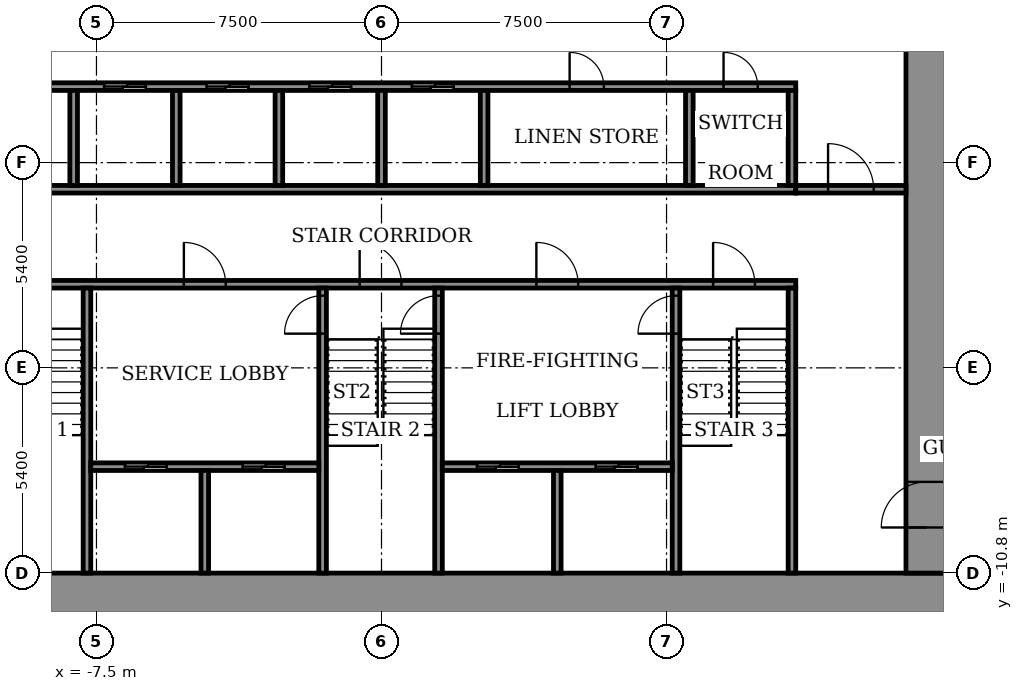
"""IFC4 building model, lengths in metres.
Left out: names, types, materials, properties, quantities, classifications, styles, units other than length and angle.
Written with IfcOpenShell. Run it as: python <this file> out.ifc"""

import sys

from ifc_helpers import new_model, si_unit, direction, frame, frame_2d, origin, place, context, subcontext, project, spatial, rectangle, extrude, element, fill, save


model = new_model("IFC4")
c1 = context("Model", 3, precision=1e-05, world=origin(), true_north=direction((0.0, 1.0)))
c2 = subcontext(c1, "Body", "Model", "MODEL_VIEW")
j1 = project(units=[si_unit("LENGTHUNIT", "METRE"), si_unit("PLANEANGLEUNIT", "RADIAN")], contexts=[c1])
p1 = place(None, origin())
s1 = spatial("IfcSite", under=j1, at=p1, CompositionType="ELEMENT")
p2 = place(p1, origin())
s2 = spatial("IfcBuilding", under=s1, at=p2, CompositionType="ELEMENT")
p3 = place(p2, frame((0.0, 0.0, 71.1)))
s3 = spatial("IfcBuildingStorey", under=s2, at=p3, CompositionType="ELEMENT", Elevation=71.1)
p4 = place(p3, frame((-14.9, -11.35, 0.0), z_axis=(0.0, 0.0, 1.0), x_axis=(1.0, 0.0, 0.0)))
e1 = element("IfcWall", 1, at=p4, inside=s3, PredefinedType="SHEAR", context=c2, shape_type="SweptSolid", body=[
    extrude(rectangle(XDim=29.8, YDim=1.1, at=frame_2d((14.9, 0.0))), origin(), (0.0, 0.0, 1.0), 3.6),
])
p5 = place(p3, frame((14.35, -10.8, 0.0), z_axis=(0.0, 0.0, 1.0), x_axis=(0.0, 1.0, 0.0)))
e2 = element("IfcWall", 2, at=p5, inside=s3, PredefinedType="SHEAR", context=c2, shape_type="SweptSolid", body=[
    extrude(rectangle(XDim=21.6, YDim=1.1, at=frame_2d((10.8, 0.0))), origin(), (0.0, 0.0, 1.0), 3.6),
])
p6 = place(p5, frame((1.2, 0.0, 0.0)))
e3 = element("IfcOpeningElement", 3, at=p6, cuts=e2, PredefinedType="OPENING", context=c2, shape_type="SweptSolid", body=[
    extrude(rectangle(XDim=1.2, YDim=2.1, at=frame_2d((0.6, 1.05))), frame((0.0, 0.56, 0.0), z_axis=(0.0, -1.0, 0.0), x_axis=(1.0, 0.0, 0.0)), (0.0, 0.0, 1.0), 1.12),
])
p7 = place(p3, frame((-10.9, -3.2, 0.0), z_axis=(0.0, 0.0, 1.0), x_axis=(1.0, 0.0, 0.0)))
e4 = element("IfcWall", 4, at=p7, inside=s3, PredefinedType="SHEAR", context=c2, shape_type="SweptSolid", body=[
    extrude(rectangle(XDim=21.8, YDim=0.2, at=frame_2d((10.9, 0.0))), origin(), (0.0, 0.0, 1.0), 3.05),
])
p8 = place(p7, frame((1.075, 0.0, 0.0)))
e5 = element("IfcOpeningElement", 5, at=p8, cuts=e4, PredefinedType="OPENING", context=c2, shape_type="SweptSolid", body=[
    extrude(rectangle(XDim=1.1, YDim=2.1, at=frame_2d((0.55, 1.05))), frame((0.0, 0.11, 0.0), z_axis=(0.0, -1.0, 0.0), x_axis=(1.0, 0.0, 0.0)), (0.0, 0.0, 1.0), 0.22),
])
p9 = place(p7, frame((10.325, 0.0, 0.0)))
e6 = element("IfcOpeningElement", 6, at=p9, cuts=e4, PredefinedType="OPENING", context=c2, shape_type="SweptSolid", body=[
    extrude(rectangle(XDim=1.1, YDim=2.1, at=frame_2d((0.55, 1.05))), frame((0.0, 0.11, 0.0), z_axis=(0.0, -1.0, 0.0), x_axis=(1.0, 0.0, 0.0)), (0.0, 0.0, 1.0), 0.22),
])
p10 = place(p7, frame((19.625, 0.0, 0.0)))
e7 = element("IfcOpeningElement", 7, at=p10, cuts=e4, PredefinedType="OPENING", context=c2, shape_type="SweptSolid", body=[
    extrude(rectangle(XDim=1.1, YDim=2.1, at=frame_2d((0.55, 1.05))), frame((0.0, 0.11, 0.0), z_axis=(0.0, -1.0, 0.0), x_axis=(1.0, 0.0, 0.0)), (0.0, 0.0, 1.0), 0.22),
])
p11 = place(p7, frame((5.7, 0.0, 0.0)))
e8 = element("IfcOpeningElement", 8, at=p11, cuts=e4, PredefinedType="OPENING", context=c2, shape_type="SweptSolid", body=[
    extrude(rectangle(XDim=1.1, YDim=2.1, at=frame_2d((0.55, 1.05))), frame((0.0, 0.11, 0.0), z_axis=(0.0, -1.0, 0.0), x_axis=(1.0, 0.0, 0.0)), (0.0, 0.0, 1.0), 0.22),
])
p12 = place(p7, frame((14.975, 0.0, 0.0)))
e9 = element("IfcOpeningElement", 9, at=p12, cuts=e4, PredefinedType="OPENING", context=c2, shape_type="SweptSolid", body=[
    extrude(rectangle(XDim=1.1, YDim=2.1, at=frame_2d((0.55, 1.05))), frame((0.0, 0.11, 0.0), z_axis=(0.0, -1.0, 0.0), x_axis=(1.0, 0.0, 0.0)), (0.0, 0.0, 1.0), 0.22),
])
p13 = place(p3, frame((-10.9, -0.7, 0.0), z_axis=(0.0, 0.0, 1.0), x_axis=(1.0, 0.0, 0.0)))
e10 = element("IfcWall", 10, at=p13, inside=s3, PredefinedType="SHEAR", context=c2, shape_type="SweptSolid", body=[
    extrude(rectangle(XDim=21.8, YDim=0.2, at=frame_2d((10.9, 0.0))), origin(), (0.0, 0.0, 1.0), 3.05),
])
p14 = place(p3, frame((-10.9, 2.0, 0.0), z_axis=(0.0, 0.0, 1.0), x_axis=(1.0, 0.0, 0.0)))
e11 = element("IfcWall", 11, at=p14, inside=s3, PredefinedType="SHEAR", context=c2, shape_type="SweptSolid", body=[
    extrude(rectangle(XDim=21.8, YDim=0.2, at=frame_2d((10.9, 0.0))), origin(), (0.0, 0.0, 1.0), 3.05),
])
p15 = place(p14, frame((0.9, 0.0, 0.0)))
e12 = element("IfcOpeningElement", 12, at=p15, cuts=e11, PredefinedType="OPENING", context=c2, shape_type="SweptSolid", body=[
    extrude(rectangle(XDim=1.1, YDim=2.1, at=frame_2d((0.55, 1.05))), frame((0.0, 0.11, 0.0), z_axis=(0.0, -1.0, 0.0), x_axis=(1.0, 0.0, 0.0)), (0.0, 0.0, 1.0), 0.22),
])
p16 = place(p14, frame((3.6, 0.0, 0.0)))
e13 = element("IfcOpeningElement", 13, at=p16, cuts=e11, PredefinedType="OPENING", context=c2, shape_type="SweptSolid", body=[
    extrude(rectangle(XDim=1.1, YDim=2.1, at=frame_2d((0.55, 1.05))), frame((0.0, 0.11, 0.0), z_axis=(0.0, -1.0, 0.0), x_axis=(1.0, 0.0, 0.0)), (0.0, 0.0, 1.0), 0.22),
])
p17 = place(p14, frame((6.3, 0.0, 0.0)))
e14 = element("IfcOpeningElement", 14, at=p17, cuts=e11, PredefinedType="OPENING", context=c2, shape_type="SweptSolid", body=[
    extrude(rectangle(XDim=1.1, YDim=2.1, at=frame_2d((0.55, 1.05))), frame((0.0, 0.11, 0.0), z_axis=(0.0, -1.0, 0.0), x_axis=(1.0, 0.0, 0.0)), (0.0, 0.0, 1.0), 0.22),
])
p18 = place(p14, frame((9.0, 0.0, 0.0)))
e15 = element("IfcOpeningElement", 15, at=p18, cuts=e11, PredefinedType="OPENING", context=c2, shape_type="SweptSolid", body=[
    extrude(rectangle(XDim=1.1, YDim=2.1, at=frame_2d((0.55, 1.05))), frame((0.0, 0.11, 0.0), z_axis=(0.0, -1.0, 0.0), x_axis=(1.0, 0.0, 0.0)), (0.0, 0.0, 1.0), 0.22),
])
p19 = place(p14, frame((11.7, 0.0, 0.0)))
e16 = element("IfcOpeningElement", 16, at=p19, cuts=e11, PredefinedType="OPENING", context=c2, shape_type="SweptSolid", body=[
    extrude(rectangle(XDim=1.1, YDim=2.1, at=frame_2d((0.55, 1.05))), frame((0.0, 0.11, 0.0), z_axis=(0.0, -1.0, 0.0), x_axis=(1.0, 0.0, 0.0)), (0.0, 0.0, 1.0), 0.22),
])
p20 = place(p14, frame((15.85, 0.0, 0.0)))
e17 = element("IfcOpeningElement", 17, at=p20, cuts=e11, PredefinedType="OPENING", context=c2, shape_type="SweptSolid", body=[
    extrude(rectangle(XDim=0.9, YDim=2.1, at=frame_2d((0.45, 1.05))), frame((0.0, 0.11, 0.0), z_axis=(0.0, -1.0, 0.0), x_axis=(1.0, 0.0, 0.0)), (0.0, 0.0, 1.0), 0.22),
])
p21 = place(p14, frame((19.9, 0.0, 0.0)))
e18 = element("IfcOpeningElement", 18, at=p21, cuts=e11, PredefinedType="OPENING", context=c2, shape_type="SweptSolid", body=[
    extrude(rectangle(XDim=0.9, YDim=2.1, at=frame_2d((0.45, 1.05))), frame((0.0, 0.11, 0.0), z_axis=(0.0, -1.0, 0.0), x_axis=(1.0, 0.0, 0.0)), (0.0, 0.0, 1.0), 0.22),
])
p22 = place(p3, frame((-7.75, -10.8, 0.0), z_axis=(0.0, 0.0, 1.0), x_axis=(0.0, 1.0, 0.0)))
e19 = element("IfcWall", 19, at=p22, inside=s3, PredefinedType="SHEAR", context=c2, shape_type="SweptSolid", body=[
    extrude(rectangle(XDim=7.5, YDim=0.2, at=frame_2d((3.75, 0.0))), origin(), (0.0, 0.0, 1.0), 3.05),
])
p23 = place(p3, frame((-1.55, -10.8, 0.0), z_axis=(0.0, 0.0, 1.0), x_axis=(0.0, 1.0, 0.0)))
e20 = element("IfcWall", 20, at=p23, inside=s3, PredefinedType="SHEAR", context=c2, shape_type="SweptSolid", body=[
    extrude(rectangle(XDim=7.5, YDim=0.2, at=frame_2d((3.75, 0.0))), origin(), (0.0, 0.0, 1.0), 3.05),
])
p24 = place(p23, frame((6.3, 0.0, 0.0)))
e21 = element("IfcOpeningElement", 21, at=p24, cuts=e20, PredefinedType="OPENING", context=c2, shape_type="SweptSolid", body=[
    extrude(rectangle(XDim=1.0, YDim=2.1, at=frame_2d((0.5, 1.05))), frame((0.0, 0.11, 0.0), z_axis=(0.0, -1.0, 0.0), x_axis=(1.0, 0.0, 0.0)), (0.0, 0.0, 1.0), 0.22),
])
p25 = place(p3, frame((1.5, -10.8, 0.0), z_axis=(0.0, 0.0, 1.0), x_axis=(0.0, 1.0, 0.0)))
e22 = element("IfcWall", 22, at=p25, inside=s3, PredefinedType="SHEAR", context=c2, shape_type="SweptSolid", body=[
    extrude(rectangle(XDim=7.5, YDim=0.2, at=frame_2d((3.75, 0.0))), origin(), (0.0, 0.0, 1.0), 3.05),
])
p26 = place(p25, frame((6.3, 0.0, 0.0)))
e23 = element("IfcOpeningElement", 23, at=p26, cuts=e22, PredefinedType="OPENING", context=c2, shape_type="SweptSolid", body=[
    extrude(rectangle(XDim=1.0, YDim=2.1, at=frame_2d((0.5, 1.05))), frame((0.0, 0.11, 0.0), z_axis=(0.0, -1.0, 0.0), x_axis=(1.0, 0.0, 0.0)), (0.0, 0.0, 1.0), 0.22),
])
p27 = place(p3, frame((7.75, -10.8, 0.0), z_axis=(0.0, 0.0, 1.0), x_axis=(0.0, 1.0, 0.0)))
e24 = element("IfcWall", 24, at=p27, inside=s3, PredefinedType="SHEAR", context=c2, shape_type="SweptSolid", body=[
    extrude(rectangle(XDim=7.5, YDim=0.2, at=frame_2d((3.75, 0.0))), origin(), (0.0, 0.0, 1.0), 3.05),
])
p28 = place(p27, frame((6.3, 0.0, 0.0)))
e25 = element("IfcOpeningElement", 25, at=p28, cuts=e24, PredefinedType="OPENING", context=c2, shape_type="SweptSolid", body=[
    extrude(rectangle(XDim=1.0, YDim=2.1, at=frame_2d((0.5, 1.05))), frame((0.0, 0.11, 0.0), z_axis=(0.0, -1.0, 0.0), x_axis=(1.0, 0.0, 0.0)), (0.0, 0.0, 1.0), 0.22),
])
p29 = place(p3, frame((10.8, -10.8, 0.0), z_axis=(0.0, 0.0, 1.0), x_axis=(0.0, 1.0, 0.0)))
e26 = element("IfcWall", 26, at=p29, inside=s3, PredefinedType="SHEAR", context=c2, shape_type="SweptSolid", body=[
    extrude(rectangle(XDim=7.5, YDim=0.2, at=frame_2d((3.75, 0.0))), origin(), (0.0, 0.0, 1.0), 3.05),
])
p30 = place(p3, frame((-7.65, -8.0, 0.0), z_axis=(0.0, 0.0, 1.0), x_axis=(1.0, 0.0, 0.0)))
e27 = element("IfcWall", 27, at=p30, inside=s3, PredefinedType="SHEAR", context=c2, shape_type="SweptSolid", body=[
    extrude(rectangle(XDim=6.0, YDim=0.2, at=frame_2d((3.0, 0.0))), origin(), (0.0, 0.0, 1.0), 3.05),
])
p31 = place(p30, frame((0.9, 0.0, 0.0)))
e28 = element("IfcOpeningElement", 28, at=p31, cuts=e27, PredefinedType="OPENING", context=c2, shape_type="SweptSolid", body=[
    extrude(rectangle(XDim=1.1, YDim=2.1, at=frame_2d((0.55, 1.05))), frame((0.0, 0.11, 0.0), z_axis=(0.0, -1.0, 0.0), x_axis=(1.0, 0.0, 0.0)), (0.0, 0.0, 1.0), 0.22),
])
p32 = place(p30, frame((4.0, 0.0, 0.0)))
e29 = element("IfcOpeningElement", 29, at=p32, cuts=e27, PredefinedType="OPENING", context=c2, shape_type="SweptSolid", body=[
    extrude(rectangle(XDim=1.1, YDim=2.1, at=frame_2d((0.55, 1.05))), frame((0.0, 0.11, 0.0), z_axis=(0.0, -1.0, 0.0), x_axis=(1.0, 0.0, 0.0)), (0.0, 0.0, 1.0), 0.22),
])
p33 = place(p3, frame((-4.65, -10.8, 0.0), z_axis=(0.0, 0.0, 1.0), x_axis=(0.0, 1.0, 0.0)))
e30 = element("IfcWall", 30, at=p33, inside=s3, PredefinedType="SHEAR", context=c2, shape_type="SweptSolid", body=[
    extrude(rectangle(XDim=2.7, YDim=0.2, at=frame_2d((1.35, 0.0))), origin(), (0.0, 0.0, 1.0), 3.05),
])
p34 = place(p3, frame((1.6, -8.0, 0.0), z_axis=(0.0, 0.0, 1.0), x_axis=(1.0, 0.0, 0.0)))
e31 = element("IfcWall", 31, at=p34, inside=s3, PredefinedType="SHEAR", context=c2, shape_type="SweptSolid", body=[
    extrude(rectangle(XDim=6.05, YDim=0.2, at=frame_2d((3.025, 0.0))), origin(), (0.0, 0.0, 1.0), 3.05),
])
p35 = place(p34, frame((0.913, 0.0, 0.0)))
e32 = element("IfcOpeningElement", 32, at=p35, cuts=e31, PredefinedType="OPENING", context=c2, shape_type="SweptSolid", body=[
    extrude(rectangle(XDim=1.1, YDim=2.1, at=frame_2d((0.55, 1.05))), frame((0.0, 0.11, 0.0), z_axis=(0.0, -1.0, 0.0), x_axis=(1.0, 0.0, 0.0)), (0.0, 0.0, 1.0), 0.22),
])
p36 = place(p34, frame((4.038, 0.0, 0.0)))
e33 = element("IfcOpeningElement", 33, at=p36, cuts=e31, PredefinedType="OPENING", context=c2, shape_type="SweptSolid", body=[
    extrude(rectangle(XDim=1.1, YDim=2.1, at=frame_2d((0.55, 1.05))), frame((0.0, 0.11, 0.0), z_axis=(0.0, -1.0, 0.0), x_axis=(1.0, 0.0, 0.0)), (0.0, 0.0, 1.0), 0.22),
])
p37 = place(p3, frame((4.625, -10.8, 0.0), z_axis=(0.0, 0.0, 1.0), x_axis=(0.0, 1.0, 0.0)))
e34 = element("IfcWall", 34, at=p37, inside=s3, PredefinedType="SHEAR", context=c2, shape_type="SweptSolid", body=[
    extrude(rectangle(XDim=2.7, YDim=0.2, at=frame_2d((1.35, 0.0))), origin(), (0.0, 0.0, 1.0), 3.05),
])
for number, where, z_axis, x_axis in (
    (35, (-8.1, -0.6, 0.0), (0.0, 0.0, 1.0), (0.0, 1.0, 0.0)),
    (36, (-5.4, -0.6, 0.0), (0.0, 0.0, 1.0), (0.0, 1.0, 0.0)),
    (37, (-2.7, -0.6, 0.0), (0.0, 0.0, 1.0), (0.0, 1.0, 0.0)),
    (38, (0.0, -0.6, 0.0), (0.0, 0.0, 1.0), (0.0, 1.0, 0.0)),
    (39, (2.7, -0.6, 0.0), (0.0, 0.0, 1.0), (0.0, 1.0, 0.0)),
):
    element("IfcWall", number, at=place(p3, frame(where, z_axis=z_axis, x_axis=x_axis)), inside=s3, PredefinedType="SHEAR", context=c2, shape_type="SweptSolid", body=[
        extrude(rectangle(XDim=2.5, YDim=0.2, at=frame_2d((1.25, 0.0))), origin(), (0.0, 0.0, 1.0), 3.05),
    ])
for number, where, z_axis, x_axis in (
    (40, (8.1, -0.6, 0.0), (0.0, 0.0, 1.0), (0.0, 1.0, 0.0)),
    (41, (10.8, -0.6, 0.0), (0.0, 0.0, 1.0), (0.0, 1.0, 0.0)),
):
    element("IfcWall", number, at=place(p3, frame(where, z_axis=z_axis, x_axis=x_axis)), inside=s3, PredefinedType="STANDARD", context=c2, shape_type="SweptSolid", body=[
        extrude(rectangle(XDim=2.5, YDim=0.2, at=frame_2d((1.25, 0.0))), origin(), (0.0, 0.0, 1.0), 3.05),
    ])
p38 = place(p3, frame((10.9, -0.7, 0.0), z_axis=(0.0, 0.0, 1.0), x_axis=(1.0, 0.0, 0.0)))
e42 = element("IfcWall", 42, at=p38, inside=s3, PredefinedType="STANDARD", context=c2, shape_type="SweptSolid", body=[
    extrude(rectangle(XDim=2.9, YDim=0.2, at=frame_2d((1.45, 0.0))), origin(), (0.0, 0.0, 1.0), 3.05),
])
p39 = place(p38, frame((0.85, 0.0, 0.0)))
e43 = element("IfcOpeningElement", 43, at=p39, cuts=e42, PredefinedType="OPENING", context=c2, shape_type="SweptSolid", body=[
    extrude(rectangle(XDim=1.2, YDim=2.1, at=frame_2d((0.6, 1.05))), frame((0.0, 0.11, 0.0), z_axis=(0.0, -1.0, 0.0), x_axis=(1.0, 0.0, 0.0)), (0.0, 0.0, 1.0), 0.22),
])
p40 = place(p6, origin())
e44 = element("IfcDoor", 44, at=p40, inside=s3, OperationType="DOUBLE_DOOR_SINGLE_SWING", PredefinedType="DOOR", context=c2, shape_type="SweptSolid", body=[
    extrude(rectangle(XDim=1.2, YDim=2.1, at=frame_2d((0.6, 1.05))), frame((0.0, 0.025, 0.0), z_axis=(0.0, -1.0, 0.0), x_axis=(1.0, 0.0, 0.0)), (0.0, 0.0, 1.0), 0.05),
])
fill(e3, e44)
p41 = place(p16, origin())
e45 = element("IfcDoor", 45, at=p41, inside=s3, OperationType="SLIDING_TO_LEFT", PredefinedType="DOOR", context=c2, shape_type="SweptSolid", body=[
    extrude(rectangle(XDim=1.1, YDim=2.1, at=frame_2d((0.55, 1.05))), frame((0.0, 0.025, 0.0), z_axis=(0.0, -1.0, 0.0), x_axis=(1.0, 0.0, 0.0)), (0.0, 0.0, 1.0), 0.05),
])
fill(e13, e45)
p42 = place(p17, origin())
e46 = element("IfcDoor", 46, at=p42, inside=s3, OperationType="SLIDING_TO_LEFT", PredefinedType="DOOR", context=c2, shape_type="SweptSolid", body=[
    extrude(rectangle(XDim=1.1, YDim=2.1, at=frame_2d((0.55, 1.05))), frame((0.0, 0.025, 0.0), z_axis=(0.0, -1.0, 0.0), x_axis=(1.0, 0.0, 0.0)), (0.0, 0.0, 1.0), 0.05),
])
fill(e14, e46)
p43 = place(p18, origin())
e47 = element("IfcDoor", 47, at=p43, inside=s3, OperationType="SLIDING_TO_LEFT", PredefinedType="DOOR", context=c2, shape_type="SweptSolid", body=[
    extrude(rectangle(XDim=1.1, YDim=2.1, at=frame_2d((0.55, 1.05))), frame((0.0, 0.025, 0.0), z_axis=(0.0, -1.0, 0.0), x_axis=(1.0, 0.0, 0.0)), (0.0, 0.0, 1.0), 0.05),
])
fill(e15, e47)
p44 = place(p19, origin())
e48 = element("IfcDoor", 48, at=p44, inside=s3, OperationType="SLIDING_TO_LEFT", PredefinedType="DOOR", context=c2, shape_type="SweptSolid", body=[
    extrude(rectangle(XDim=1.1, YDim=2.1, at=frame_2d((0.55, 1.05))), frame((0.0, 0.025, 0.0), z_axis=(0.0, -1.0, 0.0), x_axis=(1.0, 0.0, 0.0)), (0.0, 0.0, 1.0), 0.05),
])
fill(e16, e48)
p45 = place(p20, origin())
e49 = element("IfcDoor", 49, at=p45, inside=s3, OperationType="SINGLE_SWING_RIGHT", PredefinedType="DOOR", context=c2, shape_type="SweptSolid", body=[
    extrude(rectangle(XDim=0.9, YDim=2.1, at=frame_2d((0.45, 1.05))), frame((0.0, 0.025, 0.0), z_axis=(0.0, -1.0, 0.0), x_axis=(1.0, 0.0, 0.0)), (0.0, 0.0, 1.0), 0.05),
])
fill(e17, e49)
p46 = place(p21, origin())
e50 = element("IfcDoor", 50, at=p46, inside=s3, OperationType="SINGLE_SWING_LEFT", PredefinedType="DOOR", context=c2, shape_type="SweptSolid", body=[
    extrude(rectangle(XDim=0.9, YDim=2.1, at=frame_2d((0.45, 1.05))), frame((0.0, 0.025, 0.0), z_axis=(0.0, -1.0, 0.0), x_axis=(1.0, 0.0, 0.0)), (0.0, 0.0, 1.0), 0.05),
])
fill(e18, e50)
p47 = place(p35, origin())
e51 = element("IfcDoor", 51, at=p47, inside=s3, OperationType="SLIDING_TO_LEFT", PredefinedType="DOOR", context=c2, shape_type="SweptSolid", body=[
    extrude(rectangle(XDim=1.1, YDim=2.1, at=frame_2d((0.55, 1.05))), frame((0.0, 0.025, 0.0), z_axis=(0.0, -1.0, 0.0), x_axis=(1.0, 0.0, 0.0)), (0.0, 0.0, 1.0), 0.05),
])
fill(e32, e51)
p48 = place(p31, origin())
e52 = element("IfcDoor", 52, at=p48, inside=s3, OperationType="SLIDING_TO_LEFT", PredefinedType="DOOR", context=c2, shape_type="SweptSolid", body=[
    extrude(rectangle(XDim=1.1, YDim=2.1, at=frame_2d((0.55, 1.05))), frame((0.0, 0.025, 0.0), z_axis=(0.0, -1.0, 0.0), x_axis=(1.0, 0.0, 0.0)), (0.0, 0.0, 1.0), 0.05),
])
fill(e28, e52)
p49 = place(p36, origin())
e53 = element("IfcDoor", 53, at=p49, inside=s3, OperationType="SLIDING_TO_LEFT", PredefinedType="DOOR", context=c2, shape_type="SweptSolid", body=[
    extrude(rectangle(XDim=1.1, YDim=2.1, at=frame_2d((0.55, 1.05))), frame((0.0, 0.025, 0.0), z_axis=(0.0, -1.0, 0.0), x_axis=(1.0, 0.0, 0.0)), (0.0, 0.0, 1.0), 0.05),
])
fill(e33, e53)
p50 = place(p32, origin())
e54 = element("IfcDoor", 54, at=p50, inside=s3, OperationType="SLIDING_TO_LEFT", PredefinedType="DOOR", context=c2, shape_type="SweptSolid", body=[
    extrude(rectangle(XDim=1.1, YDim=2.1, at=frame_2d((0.55, 1.05))), frame((0.0, 0.025, 0.0), z_axis=(0.0, -1.0, 0.0), x_axis=(1.0, 0.0, 0.0)), (0.0, 0.0, 1.0), 0.05),
])
fill(e29, e54)
p51 = place(p9, origin())
e55 = element("IfcDoor", 55, at=p51, inside=s3, OperationType="SINGLE_SWING_RIGHT", PredefinedType="DOOR", context=c2, shape_type="SweptSolid", body=[
    extrude(rectangle(XDim=1.1, YDim=2.1, at=frame_2d((0.55, 1.05))), frame((0.0, 0.025, 0.0), z_axis=(0.0, -1.0, 0.0), x_axis=(1.0, 0.0, 0.0)), (0.0, 0.0, 1.0), 0.05),
])
fill(e6, e55)
p52 = place(p10, origin())
e56 = element("IfcDoor", 56, at=p52, inside=s3, OperationType="SINGLE_SWING_RIGHT", PredefinedType="DOOR", context=c2, shape_type="SweptSolid", body=[
    extrude(rectangle(XDim=1.1, YDim=2.1, at=frame_2d((0.55, 1.05))), frame((0.0, 0.025, 0.0), z_axis=(0.0, -1.0, 0.0), x_axis=(1.0, 0.0, 0.0)), (0.0, 0.0, 1.0), 0.05),
])
fill(e7, e56)
p53 = place(p11, origin())
e57 = element("IfcDoor", 57, at=p53, inside=s3, OperationType="SINGLE_SWING_LEFT", PredefinedType="DOOR", context=c2, shape_type="SweptSolid", body=[
    extrude(rectangle(XDim=1.1, YDim=2.1, at=frame_2d((0.55, 1.05))), frame((0.0, 0.025, 0.0), z_axis=(0.0, -1.0, 0.0), x_axis=(1.0, 0.0, 0.0)), (0.0, 0.0, 1.0), 0.05),
])
fill(e8, e57)
p54 = place(p12, origin())
e58 = element("IfcDoor", 58, at=p54, inside=s3, OperationType="SINGLE_SWING_LEFT", PredefinedType="DOOR", context=c2, shape_type="SweptSolid", body=[
    extrude(rectangle(XDim=1.1, YDim=2.1, at=frame_2d((0.55, 1.05))), frame((0.0, 0.025, 0.0), z_axis=(0.0, -1.0, 0.0), x_axis=(1.0, 0.0, 0.0)), (0.0, 0.0, 1.0), 0.05),
])
fill(e9, e58)
p55 = place(p24, origin())
e59 = element("IfcDoor", 59, at=p55, inside=s3, OperationType="SINGLE_SWING_RIGHT", PredefinedType="DOOR", context=c2, shape_type="SweptSolid", body=[
    extrude(rectangle(XDim=1.0, YDim=2.1, at=frame_2d((0.5, 1.05))), frame((0.0, 0.025, 0.0), z_axis=(0.0, -1.0, 0.0), x_axis=(1.0, 0.0, 0.0)), (0.0, 0.0, 1.0), 0.05),
])
fill(e21, e59)
p56 = place(p26, origin())
e60 = element("IfcDoor", 60, at=p56, inside=s3, OperationType="SINGLE_SWING_RIGHT", PredefinedType="DOOR", context=c2, shape_type="SweptSolid", body=[
    extrude(rectangle(XDim=1.0, YDim=2.1, at=frame_2d((0.5, 1.05))), frame((0.0, 0.025, 0.0), z_axis=(0.0, -1.0, 0.0), x_axis=(1.0, 0.0, 0.0)), (0.0, 0.0, 1.0), 0.05),
])
fill(e23, e60)
p57 = place(p28, origin())
e61 = element("IfcDoor", 61, at=p57, inside=s3, OperationType="SINGLE_SWING_RIGHT", PredefinedType="DOOR", context=c2, shape_type="SweptSolid", body=[
    extrude(rectangle(XDim=1.0, YDim=2.1, at=frame_2d((0.5, 1.05))), frame((0.0, 0.025, 0.0), z_axis=(0.0, -1.0, 0.0), x_axis=(1.0, 0.0, 0.0)), (0.0, 0.0, 1.0), 0.05),
])
fill(e25, e61)
p58 = place(p39, origin())
e62 = element("IfcDoor", 62, at=p58, inside=s3, OperationType="SINGLE_SWING_LEFT", PredefinedType="DOOR", context=c2, shape_type="SweptSolid", body=[
    extrude(rectangle(XDim=1.2, YDim=2.1, at=frame_2d((0.6, 1.05))), frame((0.0, 0.025, 0.0), z_axis=(0.0, -1.0, 0.0), x_axis=(1.0, 0.0, 0.0)), (0.0, 0.0, 1.0), 0.05),
])
fill(e43, e62)
save(model, sys.argv[1])
